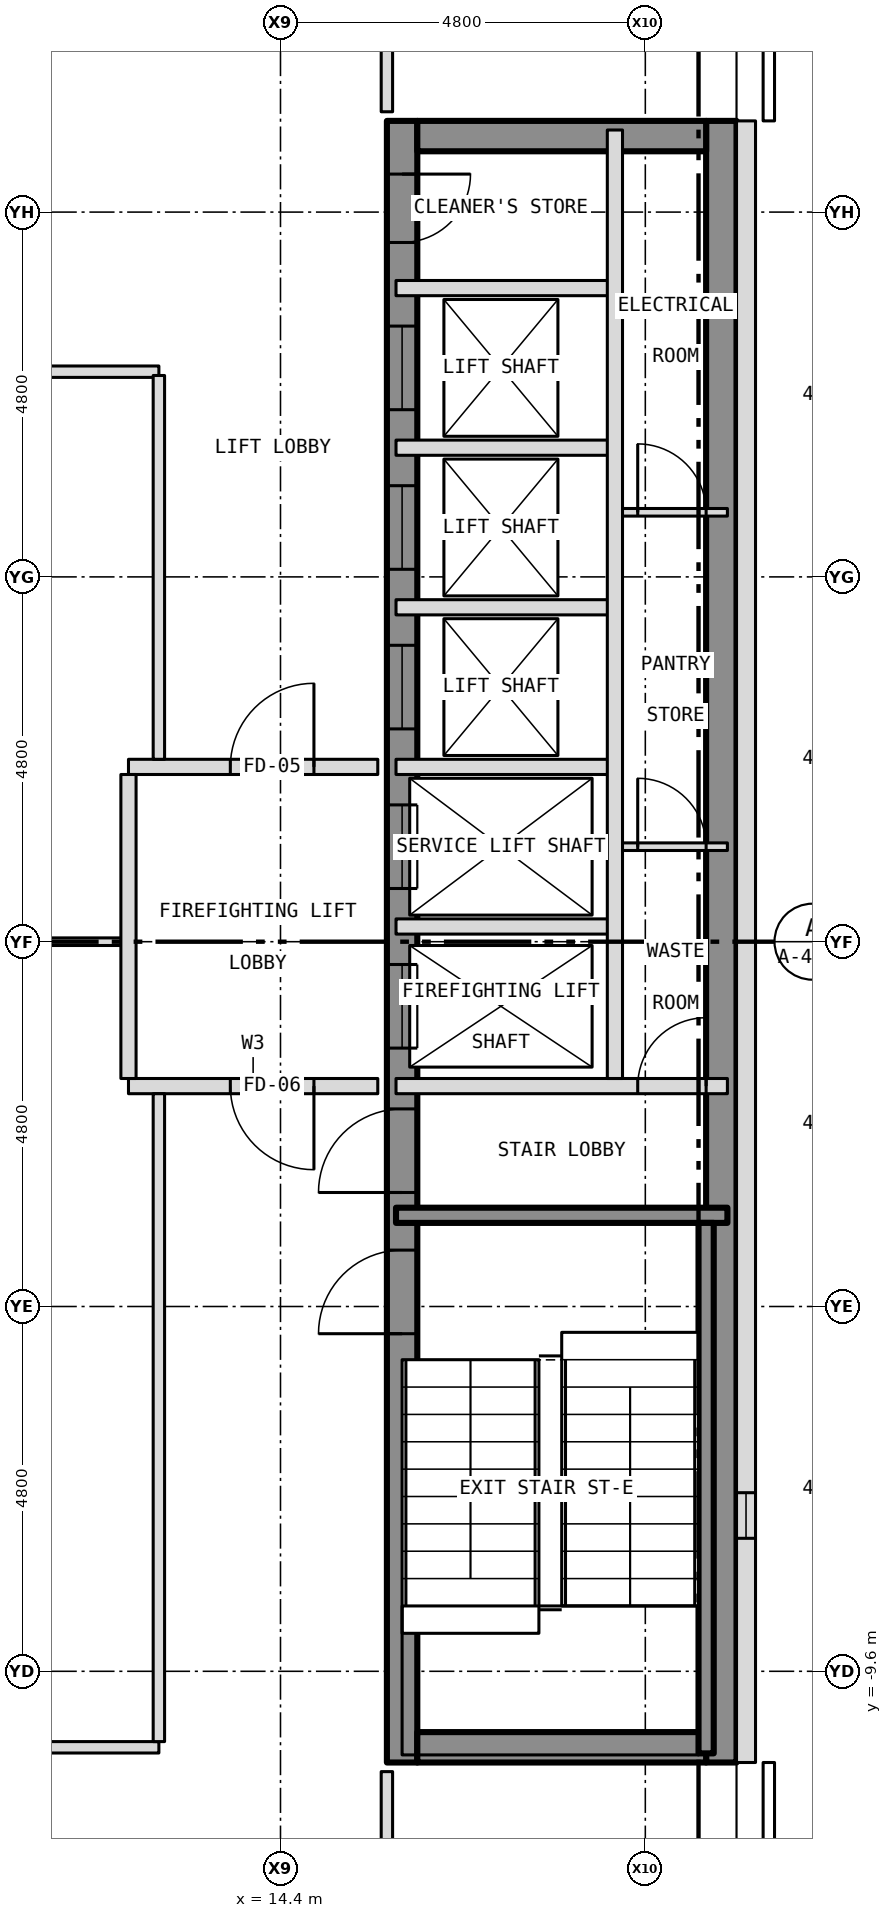
"""IFC4 building model, lengths in metres.
Left out: names, types, materials, properties, quantities, classifications, styles, units other than length and angle.
Written with IfcOpenShell. Run it as: python <this file> out.ifc"""

import sys

from ifc_helpers import new_model, si_unit, direction, frame, frame_2d, origin, place, context, subcontext, project, spatial, rectangle, extrude, element, fill, save


model = new_model("IFC4")
c1 = context("Model", 3, precision=1e-05, world=origin(), true_north=direction((0.0, 1.0)))
c2 = subcontext(c1, "Body", "Model", "MODEL_VIEW")
j1 = project(units=[si_unit("LENGTHUNIT", "METRE"), si_unit("PLANEANGLEUNIT", "RADIAN")], contexts=[c1])
p1 = place(None, origin())
s1 = spatial("IfcSite", under=j1, at=p1, CompositionType="ELEMENT")
p2 = place(p1, origin())
s2 = spatial("IfcBuilding", under=s1, at=p2, CompositionType="ELEMENT")
p3 = place(p2, frame((0.0, 0.0, 198.0)))
s3 = spatial("IfcBuildingStorey", under=s2, at=p3, CompositionType="ELEMENT", Elevation=198.0)
p4 = place(p3, frame((16.0, -10.8, 0.0), z_axis=(0.0, 0.0, 1.0), x_axis=(0.0, 1.0, 0.0)))
e1 = element("IfcWall", 1, at=p4, inside=s3, PredefinedType="SHEAR", context=c2, shape_type="SweptSolid", body=[
    extrude(rectangle(XDim=21.6, YDim=0.4, at=frame_2d((10.8, 0.0))), origin(), (0.0, 0.0, 1.0), 3.25),
])
p5 = place(p4, frame((9.4, 0.0, 0.0)))
e2 = element("IfcOpeningElement", 2, at=p5, cuts=e1, PredefinedType="OPENING", context=c2, shape_type="SweptSolid", body=[
    extrude(rectangle(XDim=1.1, YDim=2.1, at=frame_2d((0.55, 1.05))), frame((0.0, 0.212, 0.0), z_axis=(0.0, -1.0, 0.0), x_axis=(1.0, 0.0, 0.0)), (0.0, 0.0, 1.0), 0.424),
])
p6 = place(p4, frame((11.5, 0.0, 0.0)))
e3 = element("IfcOpeningElement", 3, at=p6, cuts=e1, PredefinedType="OPENING", context=c2, shape_type="SweptSolid", body=[
    extrude(rectangle(XDim=1.1, YDim=2.1, at=frame_2d((0.55, 1.05))), frame((0.0, 0.212, 0.0), z_axis=(0.0, -1.0, 0.0), x_axis=(1.0, 0.0, 0.0)), (0.0, 0.0, 1.0), 0.424),
])
p7 = place(p4, frame((13.6, 0.0, 0.0)))
e4 = element("IfcOpeningElement", 4, at=p7, cuts=e1, PredefinedType="OPENING", context=c2, shape_type="SweptSolid", body=[
    extrude(rectangle(XDim=1.1, YDim=2.1, at=frame_2d((0.55, 1.05))), frame((0.0, 0.212, 0.0), z_axis=(0.0, -1.0, 0.0), x_axis=(1.0, 0.0, 0.0)), (0.0, 0.0, 1.0), 0.424),
])
p8 = place(p4, frame((15.7, 0.0, 0.0)))
e5 = element("IfcOpeningElement", 5, at=p8, cuts=e1, PredefinedType="OPENING", context=c2, shape_type="SweptSolid", body=[
    extrude(rectangle(XDim=1.1, YDim=2.1, at=frame_2d((0.55, 1.05))), frame((0.0, 0.212, 0.0), z_axis=(0.0, -1.0, 0.0), x_axis=(1.0, 0.0, 0.0)), (0.0, 0.0, 1.0), 0.424),
])
p9 = place(p4, frame((17.8, 0.0, 0.0)))
e6 = element("IfcOpeningElement", 6, at=p9, cuts=e1, PredefinedType="OPENING", context=c2, shape_type="SweptSolid", body=[
    extrude(rectangle(XDim=1.1, YDim=2.1, at=frame_2d((0.55, 1.05))), frame((0.0, 0.212, 0.0), z_axis=(0.0, -1.0, 0.0), x_axis=(1.0, 0.0, 0.0)), (0.0, 0.0, 1.0), 0.424),
])
p10 = place(p4, frame((5.642, 0.0, 0.0)))
e7 = element("IfcOpeningElement", 7, at=p10, cuts=e1, PredefinedType="OPENING", context=c2, shape_type="SweptSolid", body=[
    extrude(rectangle(XDim=1.1, YDim=2.1, at=frame_2d((0.55, 1.05))), frame((0.0, 0.212, 0.0), z_axis=(0.0, -1.0, 0.0), x_axis=(1.0, 0.0, 0.0)), (0.0, 0.0, 1.0), 0.424),
])
p11 = place(p4, frame((7.5, 0.0, 0.0)))
e8 = element("IfcOpeningElement", 8, at=p11, cuts=e1, PredefinedType="OPENING", context=c2, shape_type="SweptSolid", body=[
    extrude(rectangle(XDim=1.1, YDim=2.1, at=frame_2d((0.55, 1.05))), frame((0.0, 0.212, 0.0), z_axis=(0.0, -1.0, 0.0), x_axis=(1.0, 0.0, 0.0)), (0.0, 0.0, 1.0), 0.424),
])
p12 = place(p4, frame((20.0, 0.0, 0.0)))
e9 = element("IfcOpeningElement", 9, at=p12, cuts=e1, PredefinedType="OPENING", context=c2, shape_type="SweptSolid", body=[
    extrude(rectangle(XDim=0.9, YDim=2.1, at=frame_2d((0.45, 1.05))), frame((0.0, 0.212, 0.0), z_axis=(0.0, -1.0, 0.0), x_axis=(1.0, 0.0, 0.0)), (0.0, 0.0, 1.0), 0.424),
])
p13 = place(p3, frame((20.2, -10.8, 0.0), z_axis=(0.0, 0.0, 1.0), x_axis=(0.0, 1.0, 0.0)))
e10 = element("IfcWall", 10, at=p13, inside=s3, PredefinedType="SHEAR", context=c2, shape_type="SweptSolid", body=[
    extrude(rectangle(XDim=21.6, YDim=0.4, at=frame_2d((10.8, 0.0))), origin(), (0.0, 0.0, 1.0), 3.25),
])
for number, where, z_axis, x_axis in (
    (11, (16.2, 10.6, 0.0), (0.0, 0.0, 1.0), (1.0, 0.0, 0.0)),
    (12, (16.2, -10.6, 0.0), (0.0, 0.0, 1.0), (1.0, 0.0, 0.0)),
):
    element("IfcWall", number, at=place(p3, frame(where, z_axis=z_axis, x_axis=x_axis)), inside=s3, PredefinedType="SHEAR", context=c2, shape_type="SweptSolid", body=[
        extrude(rectangle(XDim=3.8, YDim=0.4, at=frame_2d((1.9, 0.0))), origin(), (0.0, 0.0, 1.0), 3.25),
    ])
p14 = place(p3, frame((20.525, -10.8, 0.0), z_axis=(0.0, 0.0, 1.0), x_axis=(0.0, 1.0, 0.0)))
e13 = element("IfcWall", 13, at=p14, inside=s3, PredefinedType="SOLIDWALL", context=c2, shape_type="SweptSolid", body=[
    extrude(rectangle(XDim=21.6, YDim=0.25, at=frame_2d((10.8, 0.0))), origin(), (0.0, 0.0, 1.0), 3.5),
])
p15 = place(p14, frame((2.95, 0.0, 1.0)))
e14 = element("IfcOpeningElement", 14, at=p15, cuts=e13, PredefinedType="OPENING", context=c2, shape_type="SweptSolid", body=[
    extrude(rectangle(XDim=0.6, YDim=1.5, at=frame_2d((0.3, 0.75))), frame((0.0, 0.137, 0.0), z_axis=(0.0, -1.0, 0.0), x_axis=(1.0, 0.0, 0.0)), (0.0, 0.0, 1.0), 0.274),
])
p16 = place(p3, frame((6.3, -10.6, 0.0), z_axis=(0.0, 0.0, 1.0), x_axis=(1.0, 0.0, 0.0)))
e15 = element("IfcWall", 15, at=p16, inside=s3, PredefinedType="PARTITIONING", context=c2, shape_type="SweptSolid", body=[
    extrude(rectangle(XDim=6.5, YDim=0.15, at=frame_2d((3.25, 0.0))), origin(), (0.0, 0.0, 1.0), 3.35),
])
p17 = place(p3, frame((15.92, -3.6, 0.0), z_axis=(0.0, 0.0, 1.0), x_axis=(1.0, 0.0, 0.0)))
e16 = element("IfcWall", 16, at=p17, inside=s3, PredefinedType="SHEAR", context=c2, shape_type="SweptSolid", body=[
    extrude(rectangle(XDim=4.36, YDim=0.2, at=frame_2d((2.18, 0.0))), origin(), (0.0, 0.0, 1.0), 3.25),
])
p18 = place(p3, frame((12.4, -1.9, 0.0), z_axis=(0.0, 0.0, 1.0), x_axis=(1.0, 0.0, 0.0)))
e17 = element("IfcWall", 17, at=p18, inside=s3, PredefinedType="PARTITIONING", context=c2, shape_type="SweptSolid", body=[
    extrude(rectangle(XDim=3.28, YDim=0.2, at=frame_2d((1.64, 0.0))), origin(), (0.0, 0.0, 1.0), 3.35),
])
p19 = place(p18, frame((1.34, 0.0, 0.0)))
e18 = element("IfcOpeningElement", 18, at=p19, cuts=e17, PredefinedType="OPENING", context=c2, shape_type="SweptSolid", body=[
    extrude(rectangle(XDim=1.1, YDim=2.1, at=frame_2d((0.55, 1.05))), frame((0.0, 0.112, 0.0), z_axis=(0.0, -1.0, 0.0), x_axis=(1.0, 0.0, 0.0)), (0.0, 0.0, 1.0), 0.224),
])
p20 = place(p3, frame((15.92, -1.9, 0.0), z_axis=(0.0, 0.0, 1.0), x_axis=(1.0, 0.0, 0.0)))
e19 = element("IfcWall", 19, at=p20, inside=s3, PredefinedType="PARTITIONING", context=c2, shape_type="SweptSolid", body=[
    extrude(rectangle(XDim=4.36, YDim=0.2, at=frame_2d((2.18, 0.0))), origin(), (0.0, 0.0, 1.0), 3.25),
])
p21 = place(p20, frame((3.18, 0.0, 0.0)))
e20 = element("IfcOpeningElement", 20, at=p21, cuts=e19, PredefinedType="OPENING", context=c2, shape_type="SweptSolid", body=[
    extrude(rectangle(XDim=0.9, YDim=2.1, at=frame_2d((0.45, 1.05))), frame((0.0, 0.112, 0.0), z_axis=(0.0, -1.0, 0.0), x_axis=(1.0, 0.0, 0.0)), (0.0, 0.0, 1.0), 0.224),
])
p22 = place(p3, frame((9.787, 0.0, 0.0), z_axis=(0.0, 0.0, 1.0), x_axis=(1.0, 0.0, 0.0)))
e21 = element("IfcWall", 21, at=p22, inside=s3, PredefinedType="PARTITIONING", context=c2, shape_type="SweptSolid", body=[
    extrude(rectangle(XDim=2.613, YDim=0.1, at=frame_2d((1.306, 0.0))), origin(), (0.0, 0.0, 1.0), 2.728),
])
p23 = place(p3, frame((15.92, 0.2, 0.0), z_axis=(0.0, 0.0, 1.0), x_axis=(1.0, 0.0, 0.0)))
e22 = element("IfcWall", 22, at=p23, inside=s3, PredefinedType="PARTITIONING", context=c2, shape_type="SweptSolid", body=[
    extrude(rectangle(XDim=2.88, YDim=0.2, at=frame_2d((1.44, 0.0))), origin(), (0.0, 0.0, 1.0), 3.25),
])
p24 = place(p3, frame((18.8, 1.25, 0.0), z_axis=(0.0, 0.0, 1.0), x_axis=(1.0, 0.0, 0.0)))
e23 = element("IfcWall", 23, at=p24, inside=s3, PredefinedType="PARTITIONING", context=c2, shape_type="SweptSolid", body=[
    extrude(rectangle(XDim=1.48, YDim=0.1, at=frame_2d((0.74, 0.0))), origin(), (0.0, 0.0, 1.0), 3.25),
])
p25 = place(p24, frame((0.3, 0.0, 0.0)))
e24 = element("IfcOpeningElement", 24, at=p25, cuts=e23, PredefinedType="OPENING", context=c2, shape_type="SweptSolid", body=[
    extrude(rectangle(XDim=0.9, YDim=2.1, at=frame_2d((0.45, 1.05))), frame((0.0, 0.062, 0.0), z_axis=(0.0, -1.0, 0.0), x_axis=(1.0, 0.0, 0.0)), (0.0, 0.0, 1.0), 0.124),
])
p26 = place(p3, frame((12.4, 2.3, 0.0), z_axis=(0.0, 0.0, 1.0), x_axis=(1.0, 0.0, 0.0)))
e25 = element("IfcWall", 25, at=p26, inside=s3, PredefinedType="PARTITIONING", context=c2, shape_type="SweptSolid", body=[
    extrude(rectangle(XDim=3.28, YDim=0.2, at=frame_2d((1.64, 0.0))), origin(), (0.0, 0.0, 1.0), 3.35),
])
p27 = place(p26, frame((1.34, 0.0, 0.0)))
e26 = element("IfcOpeningElement", 26, at=p27, cuts=e25, PredefinedType="OPENING", context=c2, shape_type="SweptSolid", body=[
    extrude(rectangle(XDim=1.1, YDim=2.1, at=frame_2d((0.55, 1.05))), frame((0.0, 0.112, 0.0), z_axis=(0.0, -1.0, 0.0), x_axis=(1.0, 0.0, 0.0)), (0.0, 0.0, 1.0), 0.224),
])
for number, where, z_axis, x_axis in (
    (27, (15.92, 2.3, 0.0), (0.0, 0.0, 1.0), (1.0, 0.0, 0.0)),
    (28, (15.92, 4.4, 0.0), (0.0, 0.0, 1.0), (1.0, 0.0, 0.0)),
):
    element("IfcWall", number, at=place(p3, frame(where, z_axis=z_axis, x_axis=x_axis)), inside=s3, PredefinedType="PARTITIONING", context=c2, shape_type="SweptSolid", body=[
        extrude(rectangle(XDim=2.88, YDim=0.2, at=frame_2d((1.44, 0.0))), origin(), (0.0, 0.0, 1.0), 3.25),
    ])
p28 = place(p3, frame((18.8, 5.65, 0.0), z_axis=(0.0, 0.0, 1.0), x_axis=(1.0, 0.0, 0.0)))
e29 = element("IfcWall", 29, at=p28, inside=s3, PredefinedType="PARTITIONING", context=c2, shape_type="SweptSolid", body=[
    extrude(rectangle(XDim=1.48, YDim=0.1, at=frame_2d((0.74, 0.0))), origin(), (0.0, 0.0, 1.0), 3.25),
])
p29 = place(p28, frame((0.3, 0.0, 0.0)))
e30 = element("IfcOpeningElement", 30, at=p29, cuts=e29, PredefinedType="OPENING", context=c2, shape_type="SweptSolid", body=[
    extrude(rectangle(XDim=0.9, YDim=2.1, at=frame_2d((0.45, 1.05))), frame((0.0, 0.062, 0.0), z_axis=(0.0, -1.0, 0.0), x_axis=(1.0, 0.0, 0.0)), (0.0, 0.0, 1.0), 0.124),
])
p30 = place(p3, frame((15.92, 6.5, 0.0), z_axis=(0.0, 0.0, 1.0), x_axis=(1.0, 0.0, 0.0)))
e31 = element("IfcWall", 31, at=p30, inside=s3, PredefinedType="PARTITIONING", context=c2, shape_type="SweptSolid", body=[
    extrude(rectangle(XDim=2.88, YDim=0.2, at=frame_2d((1.44, 0.0))), origin(), (0.0, 0.0, 1.0), 3.25),
])
p31 = place(p3, frame((6.3, 7.5, 0.0), z_axis=(0.0, 0.0, 1.0), x_axis=(1.0, 0.0, 0.0)))
e32 = element("IfcWall", 32, at=p31, inside=s3, PredefinedType="PARTITIONING", context=c2, shape_type="SweptSolid", body=[
    extrude(rectangle(XDim=6.5, YDim=0.15, at=frame_2d((3.25, 0.0))), origin(), (0.0, 0.0, 1.0), 3.35),
])
p32 = place(p3, frame((15.92, 8.6, 0.0), z_axis=(0.0, 0.0, 1.0), x_axis=(1.0, 0.0, 0.0)))
e33 = element("IfcWall", 33, at=p32, inside=s3, PredefinedType="PARTITIONING", context=c2, shape_type="SweptSolid", body=[
    extrude(rectangle(XDim=2.88, YDim=0.2, at=frame_2d((1.44, 0.0))), origin(), (0.0, 0.0, 1.0), 3.25),
])
p33 = place(p3, frame((12.4, -1.8, 0.0), z_axis=(0.0, 0.0, 1.0), x_axis=(0.0, 1.0, 0.0)))
e34 = element("IfcWall", 34, at=p33, inside=s3, PredefinedType="PARTITIONING", context=c2, shape_type="SweptSolid", body=[
    extrude(rectangle(XDim=4.0, YDim=0.2, at=frame_2d((2.0, 0.0))), origin(), (0.0, 0.0, 1.0), 3.35),
])
p34 = place(p3, frame((12.8, -10.525, 0.0), z_axis=(0.0, 0.0, 1.0), x_axis=(0.0, 1.0, 0.0)))
e35 = element("IfcWall", 35, at=p34, inside=s3, PredefinedType="PARTITIONING", context=c2, shape_type="SweptSolid", body=[
    extrude(rectangle(XDim=8.525, YDim=0.15, at=frame_2d((4.262, 0.0))), origin(), (0.0, 0.0, 1.0), 3.35),
])
p35 = place(p3, frame((12.8, 2.4, 0.0), z_axis=(0.0, 0.0, 1.0), x_axis=(0.0, 1.0, 0.0)))
e36 = element("IfcWall", 36, at=p35, inside=s3, PredefinedType="PARTITIONING", context=c2, shape_type="SweptSolid", body=[
    extrude(rectangle(XDim=5.05, YDim=0.15, at=frame_2d((2.525, 0.0))), origin(), (0.0, 0.0, 1.0), 3.35),
])
for number, where, z_axis, x_axis in (
    (37, (15.8, -12.725, 0.0), (0.0, 0.0, 1.0), (0.0, 1.0, 0.0)),
    (38, (15.8, 10.92, 0.0), (0.0, 0.0, 1.0), (0.0, 1.0, 0.0)),
):
    element("IfcWall", number, at=place(p3, frame(where, z_axis=z_axis, x_axis=x_axis)), inside=s3, PredefinedType="PARTITIONING", context=c2, shape_type="SweptSolid", body=[
        extrude(rectangle(XDim=1.805, YDim=0.15, at=frame_2d((0.903, 0.0))), origin(), (0.0, 0.0, 1.0), 3.35),
    ])
p36 = place(p3, frame((18.8, -1.8, 0.0), z_axis=(0.0, 0.0, 1.0), x_axis=(0.0, 1.0, 0.0)))
e39 = element("IfcWall", 39, at=p36, inside=s3, PredefinedType="PARTITIONING", context=c2, shape_type="SweptSolid", body=[
    extrude(rectangle(XDim=12.48, YDim=0.2, at=frame_2d((6.24, 0.0))), origin(), (0.0, 0.0, 1.0), 3.25),
])
p37 = place(p3, frame((20.0, -10.68, 0.0), z_axis=(0.0, 0.0, 1.0), x_axis=(0.0, 1.0, 0.0)))
e40 = element("IfcWall", 40, at=p37, inside=s3, PredefinedType="SHEAR", context=c2, shape_type="SweptSolid", body=[
    extrude(rectangle(XDim=6.98, YDim=0.2, at=frame_2d((3.49, 0.0))), origin(), (0.0, 0.0, 1.0), 3.25),
])
p38 = place(p15, origin())
e41 = element("IfcWindow", 41, at=p38, inside=s3, PartitioningType="SINGLE_PANEL", PredefinedType="WINDOW", context=c2, shape_type="SweptSolid", body=[
    extrude(rectangle(XDim=0.6, YDim=1.5, at=frame_2d((0.3, 0.75))), frame((0.0, -0.035, 0.0), z_axis=(0.0, -1.0, 0.0), x_axis=(1.0, 0.0, 0.0)), (0.0, 0.0, 1.0), 0.06),
])
fill(e14, e41)
p39 = place(p5, origin())
e42 = element("IfcDoor", 42, at=p39, inside=s3, OperationType="SLIDING_TO_LEFT", PredefinedType="DOOR", context=c2, shape_type="SweptSolid", body=[
    extrude(rectangle(XDim=1.1, YDim=2.1, at=frame_2d((0.55, 1.05))), frame((0.0, 0.025, 0.0), z_axis=(0.0, -1.0, 0.0), x_axis=(1.0, 0.0, 0.0)), (0.0, 0.0, 1.0), 0.05),
])
fill(e2, e42)
p40 = place(p6, origin())
e43 = element("IfcDoor", 43, at=p40, inside=s3, OperationType="SLIDING_TO_LEFT", PredefinedType="DOOR", context=c2, shape_type="SweptSolid", body=[
    extrude(rectangle(XDim=1.1, YDim=2.1, at=frame_2d((0.55, 1.05))), frame((0.0, 0.025, 0.0), z_axis=(0.0, -1.0, 0.0), x_axis=(1.0, 0.0, 0.0)), (0.0, 0.0, 1.0), 0.05),
])
fill(e3, e43)
p41 = place(p7, origin())
e44 = element("IfcDoor", 44, at=p41, inside=s3, OperationType="SLIDING_TO_LEFT", PredefinedType="DOOR", context=c2, shape_type="SweptSolid", body=[
    extrude(rectangle(XDim=1.1, YDim=2.1, at=frame_2d((0.55, 1.05))), frame((0.0, 0.025, 0.0), z_axis=(0.0, -1.0, 0.0), x_axis=(1.0, 0.0, 0.0)), (0.0, 0.0, 1.0), 0.05),
])
fill(e4, e44)
p42 = place(p8, origin())
e45 = element("IfcDoor", 45, at=p42, inside=s3, OperationType="SLIDING_TO_LEFT", PredefinedType="DOOR", context=c2, shape_type="SweptSolid", body=[
    extrude(rectangle(XDim=1.1, YDim=2.1, at=frame_2d((0.55, 1.05))), frame((0.0, 0.025, 0.0), z_axis=(0.0, -1.0, 0.0), x_axis=(1.0, 0.0, 0.0)), (0.0, 0.0, 1.0), 0.05),
])
fill(e5, e45)
p43 = place(p9, origin())
e46 = element("IfcDoor", 46, at=p43, inside=s3, OperationType="SLIDING_TO_LEFT", PredefinedType="DOOR", context=c2, shape_type="SweptSolid", body=[
    extrude(rectangle(XDim=1.1, YDim=2.1, at=frame_2d((0.55, 1.05))), frame((0.0, 0.025, 0.0), z_axis=(0.0, -1.0, 0.0), x_axis=(1.0, 0.0, 0.0)), (0.0, 0.0, 1.0), 0.05),
])
fill(e6, e46)
p44 = place(p10, origin())
e47 = element("IfcDoor", 47, at=p44, inside=s3, OperationType="SINGLE_SWING_LEFT", PredefinedType="DOOR", context=c2, shape_type="SweptSolid", body=[
    extrude(rectangle(XDim=1.1, YDim=2.1, at=frame_2d((0.55, 1.05))), frame((0.0, 0.025, 0.0), z_axis=(0.0, -1.0, 0.0), x_axis=(1.0, 0.0, 0.0)), (0.0, 0.0, 1.0), 0.05),
])
fill(e7, e47)
p45 = place(p11, origin())
e48 = element("IfcDoor", 48, at=p45, inside=s3, OperationType="SINGLE_SWING_LEFT", PredefinedType="DOOR", context=c2, shape_type="SweptSolid", body=[
    extrude(rectangle(XDim=1.1, YDim=2.1, at=frame_2d((0.55, 1.05))), frame((0.0, 0.025, 0.0), z_axis=(0.0, -1.0, 0.0), x_axis=(1.0, 0.0, 0.0)), (0.0, 0.0, 1.0), 0.05),
])
fill(e8, e48)
p46 = place(p12, origin())
e49 = element("IfcDoor", 49, at=p46, inside=s3, OperationType="SINGLE_SWING_RIGHT", PredefinedType="DOOR", context=c2, shape_type="SweptSolid", body=[
    extrude(rectangle(XDim=0.9, YDim=2.1, at=frame_2d((0.45, 1.05))), frame((0.0, 0.025, 0.0), z_axis=(0.0, -1.0, 0.0), x_axis=(1.0, 0.0, 0.0)), (0.0, 0.0, 1.0), 0.05),
])
fill(e9, e49)
p47 = place(p21, origin())
e50 = element("IfcDoor", 50, at=p47, inside=s3, OperationType="SINGLE_SWING_RIGHT", PredefinedType="DOOR", context=c2, shape_type="SweptSolid", body=[
    extrude(rectangle(XDim=0.9, YDim=2.1, at=frame_2d((0.45, 1.05))), frame((0.0, 0.025, 0.0), z_axis=(0.0, -1.0, 0.0), x_axis=(1.0, 0.0, 0.0)), (0.0, 0.0, 1.0), 0.05),
])
fill(e20, e50)
p48 = place(p25, origin())
e51 = element("IfcDoor", 51, at=p48, inside=s3, OperationType="SINGLE_SWING_LEFT", PredefinedType="DOOR", context=c2, shape_type="SweptSolid", body=[
    extrude(rectangle(XDim=0.9, YDim=2.1, at=frame_2d((0.45, 1.05))), frame((0.0, 0.025, 0.0), z_axis=(0.0, -1.0, 0.0), x_axis=(1.0, 0.0, 0.0)), (0.0, 0.0, 1.0), 0.05),
])
fill(e24, e51)
p49 = place(p29, origin())
e52 = element("IfcDoor", 52, at=p49, inside=s3, OperationType="SINGLE_SWING_LEFT", PredefinedType="DOOR", context=c2, shape_type="SweptSolid", body=[
    extrude(rectangle(XDim=0.9, YDim=2.1, at=frame_2d((0.45, 1.05))), frame((0.0, 0.025, 0.0), z_axis=(0.0, -1.0, 0.0), x_axis=(1.0, 0.0, 0.0)), (0.0, 0.0, 1.0), 0.05),
])
fill(e30, e52)
p50 = place(p27, origin())
e53 = element("IfcDoor", 53, at=p50, inside=s3, OperationType="SINGLE_SWING_RIGHT", PredefinedType="DOOR", context=c2, shape_type="SweptSolid", body=[
    extrude(rectangle(XDim=1.1, YDim=2.1, at=frame_2d((0.55, 1.05))), frame((0.0, 0.025, 0.0), z_axis=(0.0, -1.0, 0.0), x_axis=(1.0, 0.0, 0.0)), (0.0, 0.0, 1.0), 0.05),
])
fill(e26, e53)
p51 = place(p19, origin())
e54 = element("IfcDoor", 54, at=p51, inside=s3, OperationType="SINGLE_SWING_RIGHT", PredefinedType="DOOR", context=c2, shape_type="SweptSolid", body=[
    extrude(rectangle(XDim=1.1, YDim=2.1, at=frame_2d((0.55, 1.05))), frame((0.0, 0.025, 0.0), z_axis=(0.0, -1.0, 0.0), x_axis=(1.0, 0.0, 0.0)), (0.0, 0.0, 1.0), 0.05),
])
fill(e18, e54)
save(model, sys.argv[1])
